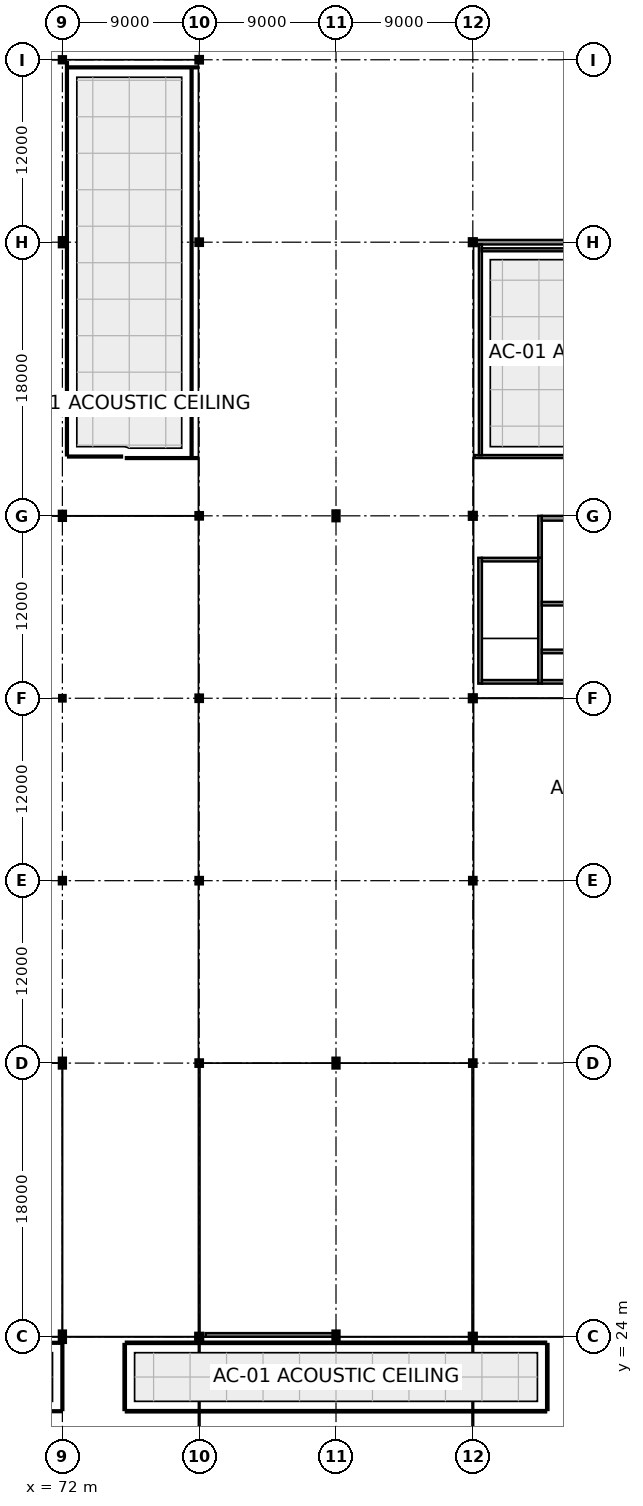
"""IFC4 building model, lengths in metres.
Left out: names, types, materials, properties, quantities, classifications, styles, units other than length and angle.
Written with IfcOpenShell. Run it as: python <this file> out.ifc"""

import sys

from ifc_helpers import new_model, si_unit, direction, frame, frame_2d, origin, origin_2d, place, context, subcontext, project, spatial, rectangle, hollow_circle, i_section, extrude, element, fill, save


model = new_model("IFC4")
c1 = context("Model", 3, precision=1e-05, world=origin(), true_north=direction((0.0, 1.0)))
c2 = subcontext(c1, "Body", "Model", "MODEL_VIEW")
j1 = project(units=[si_unit("LENGTHUNIT", "METRE"), si_unit("PLANEANGLEUNIT", "RADIAN")], contexts=[c1])
p1 = place(None, origin())
s1 = spatial("IfcSite", under=j1, at=p1, CompositionType="ELEMENT")
p2 = place(p1, origin())
s2 = spatial("IfcBuilding", under=s1, at=p2, CompositionType="ELEMENT")
p3 = place(p2, frame((0.0, 0.0, 5.4)))
s3 = spatial("IfcBuildingStorey", under=s2, at=p3, CompositionType="ELEMENT", Elevation=5.4)
p4 = place(p3, frame((72.0, 24.0, 0.0), z_axis=(0.0, 0.0, 1.0), x_axis=(1.0, 0.0, 0.0)))
e1 = element("IfcColumn", 1, at=p4, inside=s3, PredefinedType="COLUMN", context=c2, shape_type="SweptSolid", body=[
    extrude(i_section(OverallWidth=0.3, OverallDepth=0.65, WebThickness=0.016, FlangeThickness=0.031, at=origin_2d()), origin(), (0.0, 0.0, 1.0), 4.5),
])
p5 = place(p3, frame((72.0, 42.0, 0.0), z_axis=(0.0, 0.0, 1.0), x_axis=(0.0, 1.0, 0.0)))
e2 = element("IfcColumn", 2, at=p5, inside=s3, PredefinedType="COLUMN", context=c2, shape_type="SweptSolid", body=[
    extrude(i_section(OverallWidth=0.3, OverallDepth=0.55, WebThickness=0.015, FlangeThickness=0.029, at=origin_2d()), origin(), (0.0, 0.0, 1.0), 4.5),
])
p6 = place(p3, frame((72.0, 54.0, 0.0), z_axis=(0.0, 0.0, 1.0), x_axis=(1.0, 0.0, 0.0)))
e3 = element("IfcColumn", 3, at=p6, inside=s3, PredefinedType="COLUMN", context=c2, shape_type="SweptSolid", body=[
    extrude(i_section(OverallWidth=0.3, OverallDepth=0.32, WebThickness=0.011, FlangeThickness=0.021, at=origin_2d()), origin(), (0.0, 0.0, 1.0), 4.5),
])
p7 = place(p3, frame((72.0, 66.0, 0.0), z_axis=(0.0, 0.0, 1.0), x_axis=(1.0, 0.0, 0.0)))
e4 = element("IfcColumn", 4, at=p7, inside=s3, PredefinedType="COLUMN", context=c2, shape_type="SweptSolid", body=[
    extrude(i_section(OverallWidth=0.26, OverallDepth=0.26, WebThickness=0.01, FlangeThickness=0.018, at=origin_2d()), origin(), (0.0, 0.0, 1.0), 4.5),
])
for number, where, z_axis, x_axis in (
    (5, (72.0, 78.0, 0.0), (0.0, 0.0, 1.0), (1.0, 0.0, 0.0)),
    (6, (72.0, 96.0, 0.0), (0.0, 0.0, 1.0), (1.0, 0.0, 0.0)),
):
    element("IfcColumn", number, at=place(p3, frame(where, z_axis=z_axis, x_axis=x_axis)), inside=s3, PredefinedType="COLUMN", context=c2, shape_type="SweptSolid", body=[
        extrude(i_section(OverallWidth=0.3, OverallDepth=0.5, WebThickness=0.014, FlangeThickness=0.028, at=origin_2d()), origin(), (0.0, 0.0, 1.0), 4.5),
    ])
p8 = place(p3, frame((72.0, 108.0, 0.0), z_axis=(0.0, 0.0, 1.0), x_axis=(1.0, 0.0, 0.0)))
e7 = element("IfcColumn", 7, at=p8, inside=s3, PredefinedType="COLUMN", context=c2, shape_type="SweptSolid", body=[
    extrude(i_section(OverallWidth=0.3, OverallDepth=0.3, WebThickness=0.011, FlangeThickness=0.019, at=origin_2d()), origin(), (0.0, 0.0, 1.0), 4.5),
])
p9 = place(p3, frame((81.0, 24.0, 0.0), z_axis=(0.0, 0.0, 1.0), x_axis=(1.0, 0.0, 0.0)))
e8 = element("IfcColumn", 8, at=p9, inside=s3, PredefinedType="PILASTER", context=c2, shape_type="SweptSolid", body=[
    extrude(hollow_circle(Radius=0.178, WallThickness=0.016, at=origin_2d()), origin(), (0.0, 0.0, 1.0), 4.5),
])
for number, where, z_axis, x_axis in (
    (9, (81.0, 42.0, 0.0), (0.0, 0.0, 1.0), (1.0, 0.0, 0.0)),
    (10, (81.0, 54.0, 0.0), (0.0, 0.0, 1.0), (1.0, 0.0, 0.0)),
    (11, (81.0, 66.0, 0.0), (0.0, 0.0, 1.0), (1.0, 0.0, 0.0)),
    (12, (81.0, 78.0, 0.0), (0.0, 0.0, 1.0), (1.0, 0.0, 0.0)),
    (13, (81.0, 96.0, 0.0), (0.0, 0.0, 1.0), (1.0, 0.0, 0.0)),
    (14, (81.0, 108.0, 0.0), (0.0, 0.0, 1.0), (1.0, 0.0, 0.0)),
):
    element("IfcColumn", number, at=place(p3, frame(where, z_axis=z_axis, x_axis=x_axis)), inside=s3, PredefinedType="PILASTER", context=c2, shape_type="SweptSolid", body=[
        extrude(hollow_circle(Radius=0.162, WallThickness=0.012, at=origin_2d()), origin(), (0.0, 0.0, 1.0), 4.5),
    ])
p10 = place(p3, frame((90.0, 24.0, 0.0), z_axis=(0.0, 0.0, 1.0), x_axis=(1.0, 0.0, 0.0)))
e15 = element("IfcColumn", 15, at=p10, inside=s3, PredefinedType="COLUMN", context=c2, shape_type="SweptSolid", body=[
    extrude(i_section(OverallWidth=0.3, OverallDepth=0.65, WebThickness=0.016, FlangeThickness=0.031, at=origin_2d()), origin(), (0.0, 0.0, 1.0), 4.5),
])
for number, where, z_axis, x_axis in (
    (16, (90.0, 42.0, 0.0), (0.0, 0.0, 1.0), (1.0, 0.0, 0.0)),
    (17, (90.0, 78.0, 0.0), (0.0, 0.0, 1.0), (1.0, 0.0, 0.0)),
):
    element("IfcColumn", number, at=place(p3, frame(where, z_axis=z_axis, x_axis=x_axis)), inside=s3, PredefinedType="COLUMN", context=c2, shape_type="SweptSolid", body=[
        extrude(i_section(OverallWidth=0.3, OverallDepth=0.55, WebThickness=0.015, FlangeThickness=0.029, at=origin_2d()), origin(), (0.0, 0.0, 1.0), 4.5),
    ])
p11 = place(p3, frame((99.0, 24.0, 0.0), z_axis=(0.0, 0.0, 1.0), x_axis=(1.0, 0.0, 0.0)))
e18 = element("IfcColumn", 18, at=p11, inside=s3, PredefinedType="PILASTER", context=c2, shape_type="SweptSolid", body=[
    extrude(hollow_circle(Radius=0.178, WallThickness=0.016, at=origin_2d()), origin(), (0.0, 0.0, 1.0), 4.5),
])
for number, where, z_axis, x_axis in (
    (19, (99.0, 42.0, 0.0), (0.0, 0.0, 1.0), (1.0, 0.0, 0.0)),
    (20, (99.0, 54.0, 0.0), (0.0, 0.0, 1.0), (1.0, 0.0, 0.0)),
):
    element("IfcColumn", number, at=place(p3, frame(where, z_axis=z_axis, x_axis=x_axis)), inside=s3, PredefinedType="PILASTER", context=c2, shape_type="SweptSolid", body=[
        extrude(hollow_circle(Radius=0.162, WallThickness=0.012, at=origin_2d()), origin(), (0.0, 0.0, 1.0), 4.5),
    ])
for number, where, z_axis, x_axis in (
    (21, (99.0, 66.0, 0.0), (0.0, 0.0, 1.0), (1.0, 0.0, 0.0)),
    (22, (99.0, 78.0, 0.0), (0.0, 0.0, 1.0), (1.0, 0.0, 0.0)),
    (23, (99.0, 96.0, 0.0), (0.0, 0.0, 1.0), (1.0, 0.0, 0.0)),
):
    element("IfcColumn", number, at=place(p3, frame(where, z_axis=z_axis, x_axis=x_axis)), inside=s3, PredefinedType="PILASTER", context=c2, shape_type="SweptSolid", body=[
        extrude(hollow_circle(Radius=0.178, WallThickness=0.016, at=origin_2d()), origin(), (0.0, 0.0, 1.0), 4.5),
    ])
p12 = place(p3, frame((107.992, 96.0, 0.0), z_axis=(0.0, 0.0, 1.0), x_axis=(-1.0, 0.0, 0.0)))
e24 = element("IfcWall", 24, at=p12, inside=s3, PredefinedType="SOLIDWALL", context=c2, shape_type="SweptSolid", body=[
    extrude(rectangle(XDim=8.768, YDim=0.3, at=frame_2d((4.384, 0.0))), origin(), (0.0, 0.0, 1.0), 3.655),
])
p13 = place(p12, frame((1.455, 0.0, 0.8)))
e25 = element("IfcOpeningElement", 25, at=p13, cuts=e24, PredefinedType="OPENING", context=c2, shape_type="SweptSolid", body=[
    extrude(rectangle(XDim=2.0, YDim=2.0, at=frame_2d((1.0, 1.0))), frame((0.0, 0.165, 0.0), z_axis=(0.0, -1.0, 0.0), x_axis=(1.0, 0.0, 0.0)), (0.0, 0.0, 1.0), 0.33),
])
p14 = place(p12, frame((5.313, 0.0, 0.8)))
e26 = element("IfcOpeningElement", 26, at=p14, cuts=e24, PredefinedType="OPENING", context=c2, shape_type="SweptSolid", body=[
    extrude(rectangle(XDim=2.0, YDim=2.0, at=frame_2d((1.0, 1.0))), frame((0.0, 0.165, 0.0), z_axis=(0.0, -1.0, 0.0), x_axis=(1.0, 0.0, 0.0)), (0.0, 0.0, 1.0), 0.33),
])
p15 = place(p3, frame((81.42, 24.12, -0.1), z_axis=(0.0, 0.0, 1.0), x_axis=(1.0, 0.0, 0.0)))
e27 = element("IfcWall", 27, at=p15, inside=s3, PredefinedType="PARAPET", context=c2, shape_type="SweptSolid", body=[
    extrude(rectangle(XDim=8.52, YDim=0.24, at=frame_2d((4.26, 0.0))), origin(), (0.0, 0.0, 1.0), 0.85),
])
p16 = place(p3, frame((99.48, 66.96, 0.0), z_axis=(0.0, 0.0, 1.0), x_axis=(0.0, 1.0, 0.0)))
e28 = element("IfcWall", 28, at=p16, inside=s3, PredefinedType="SHEAR", context=c2, shape_type="SweptSolid", body=[
    extrude(rectangle(XDim=8.28, YDim=0.24, at=frame_2d((4.14, 0.0))), origin(), (0.0, 0.0, 1.0), 4.31),
])
p17 = place(p3, frame((103.42, 66.96, 0.0), z_axis=(0.0, 0.0, 1.0), x_axis=(0.0, 1.0, 0.0)))
e29 = element("IfcWall", 29, at=p17, inside=s3, PredefinedType="SHEAR", context=c2, shape_type="SweptSolid", body=[
    extrude(rectangle(XDim=8.28, YDim=0.24, at=frame_2d((4.14, 0.0))), origin(), (0.0, 0.0, 1.0), 4.31),
])
p18 = place(p17, frame((6.49, 0.0, 0.0)))
e30 = element("IfcOpeningElement", 30, at=p18, cuts=e29, PredefinedType="OPENING", context=c2, shape_type="SweptSolid", body=[
    extrude(rectangle(XDim=1.3, YDim=2.2, at=frame_2d((0.65, 1.1))), frame((0.0, 0.135, 0.0), z_axis=(0.0, -1.0, 0.0), x_axis=(1.0, 0.0, 0.0)), (0.0, 0.0, 1.0), 0.27),
])
for number, where, z_axis, x_axis in (
    (31, (99.6, 67.08, 0.0), (0.0, 0.0, 1.0), (1.0, 0.0, 0.0)),
    (32, (99.6, 75.12, 0.0), (0.0, 0.0, 1.0), (1.0, 0.0, 0.0)),
):
    element("IfcWall", number, at=place(p3, frame(where, z_axis=z_axis, x_axis=x_axis)), inside=s3, PredefinedType="SHEAR", context=c2, shape_type="SweptSolid", body=[
        extrude(rectangle(XDim=3.7, YDim=0.24, at=frame_2d((1.85, 0.0))), origin(), (0.0, 0.0, 1.0), 4.31),
    ])
p19 = place(p3, frame((103.42, 75.24, 0.0), z_axis=(0.0, 0.0, 1.0), x_axis=(0.0, 1.0, 0.0)))
e33 = element("IfcWall", 33, at=p19, inside=s3, PredefinedType="SHEAR", context=c2, shape_type="SweptSolid", body=[
    extrude(rectangle(XDim=2.76, YDim=0.24, at=frame_2d((1.38, 0.0))), origin(), (0.0, 0.0, 1.0), 4.16),
])
p20 = place(p3, frame((103.54, 77.84, 0.0), z_axis=(0.0, 0.0, 1.0), x_axis=(1.0, 0.0, 0.0)))
e34 = element("IfcWall", 34, at=p20, inside=s3, PredefinedType="SHEAR", context=c2, shape_type="SweptSolid", body=[
    extrude(rectangle(XDim=3.9, YDim=0.32, at=frame_2d((1.95, 0.0))), origin(), (0.0, 0.0, 1.0), 4.16),
])
p21 = place(p20, frame((1.225, 0.0, 0.0)))
e35 = element("IfcOpeningElement", 35, at=p21, cuts=e34, PredefinedType="OPENING", context=c2, shape_type="SweptSolid", body=[
    extrude(rectangle(XDim=1.45, YDim=2.2, at=frame_2d((0.725, 1.1))), frame((0.0, 0.175, 0.0), z_axis=(0.0, -1.0, 0.0), x_axis=(1.0, 0.0, 0.0)), (0.0, 0.0, 1.0), 0.35),
])
p22 = place(p3, frame((103.54, 72.22, 0.0), z_axis=(0.0, 0.0, 1.0), x_axis=(1.0, 0.0, 0.0)))
e36 = element("IfcWall", 36, at=p22, inside=s3, PredefinedType="SHEAR", context=c2, shape_type="SweptSolid", body=[
    extrude(rectangle(XDim=3.9, YDim=0.24, at=frame_2d((1.95, 0.0))), origin(), (0.0, 0.0, 1.0), 4.31),
])
p23 = place(p22, frame((0.385, 0.0, 0.0)))
e37 = element("IfcOpeningElement", 37, at=p23, cuts=e36, PredefinedType="OPENING", context=c2, shape_type="SweptSolid", body=[
    extrude(rectangle(XDim=1.3, YDim=2.2, at=frame_2d((0.65, 1.1))), frame((0.0, 0.135, 0.0), z_axis=(0.0, -1.0, 0.0), x_axis=(1.0, 0.0, 0.0)), (0.0, 0.0, 1.0), 0.27),
])
p24 = place(p22, frame((2.335, 0.0, 0.0)))
e38 = element("IfcOpeningElement", 38, at=p24, cuts=e36, PredefinedType="OPENING", context=c2, shape_type="SweptSolid", body=[
    extrude(rectangle(XDim=1.3, YDim=2.2, at=frame_2d((0.65, 1.1))), frame((0.0, 0.135, 0.0), z_axis=(0.0, -1.0, 0.0), x_axis=(1.0, 0.0, 0.0)), (0.0, 0.0, 1.0), 0.27),
])
p25 = place(p3, frame((103.54, 69.08, 0.0), z_axis=(0.0, 0.0, 1.0), x_axis=(1.0, 0.0, 0.0)))
e39 = element("IfcWall", 39, at=p25, inside=s3, PredefinedType="SHEAR", context=c2, shape_type="SweptSolid", body=[
    extrude(rectangle(XDim=3.9, YDim=0.24, at=frame_2d((1.95, 0.0))), origin(), (0.0, 0.0, 1.0), 4.31),
])
p26 = place(p3, frame((103.54, 67.08, 0.0), z_axis=(0.0, 0.0, 1.0), x_axis=(1.0, 0.0, 0.0)))
e40 = element("IfcWall", 40, at=p26, inside=s3, PredefinedType="SHEAR", context=c2, shape_type="SweptSolid", body=[
    extrude(rectangle(XDim=2.26, YDim=0.24, at=frame_2d((1.13, 0.0))), origin(), (0.0, 0.0, 1.0), 4.31),
])
p27 = place(p3, frame((75.92, 81.9, 0.0), z_axis=(0.0, 0.0, 1.0), x_axis=(-1.0, 0.0, 0.0)))
e41 = element("IfcWall", 41, at=p27, inside=s3, PredefinedType="PARTITIONING", context=c2, shape_type="SweptSolid", body=[
    extrude(rectangle(XDim=3.54, YDim=0.12, at=frame_2d((1.77, 0.0))), origin(), (0.0, 0.0, 1.0), 4.14),
])
p28 = place(p27, frame((1.32, 0.0, 0.0)))
e42 = element("IfcOpeningElement", 42, at=p28, cuts=e41, PredefinedType="OPENING", context=c2, shape_type="SweptSolid", body=[
    extrude(rectangle(XDim=0.9, YDim=2.1, at=frame_2d((0.45, 1.05))), frame((0.0, 0.075, 0.0), z_axis=(0.0, -1.0, 0.0), x_axis=(1.0, 0.0, 0.0)), (0.0, 0.0, 1.0), 0.15),
])
p29 = place(p3, frame((72.3, 81.98, 0.0), z_axis=(0.0, 0.0, 1.0), x_axis=(0.0, 1.0, 0.0)))
e43 = element("IfcWall", 43, at=p29, inside=s3, PredefinedType="PARTITIONING", context=c2, shape_type="SweptSolid", body=[
    extrude(rectangle(XDim=25.872, YDim=0.12, at=frame_2d((12.936, 0.0))), origin(), (0.0, 0.0, 1.0), 4.14),
])
p30 = place(p3, frame((72.355, 107.5, 0.0), z_axis=(0.0, 0.0, 1.0), x_axis=(1.0, 0.0, 0.0)))
e44 = element("IfcWall", 44, at=p30, inside=s3, PredefinedType="PARTITIONING", context=c2, shape_type="SweptSolid", body=[
    extrude(rectangle(XDim=8.52, YDim=0.12, at=frame_2d((4.26, 0.0))), origin(), (0.0, 0.0, 1.0), 4.14),
])
p31 = place(p3, frame((80.5, 107.445, 0.0), z_axis=(0.0, 0.0, 1.0), x_axis=(0.0, -1.0, 0.0)))
e45 = element("IfcWall", 45, at=p31, inside=s3, PredefinedType="PARTITIONING", context=c2, shape_type="SweptSolid", body=[
    extrude(rectangle(XDim=25.565, YDim=0.12, at=frame_2d((12.783, 0.0))), origin(), (0.0, 0.0, 1.0), 4.14),
])
p32 = place(p3, frame((80.875, 81.8, 0.0), z_axis=(0.0, 0.0, 1.0), x_axis=(-1.0, 0.0, 0.0)))
e46 = element("IfcWall", 46, at=p32, inside=s3, PredefinedType="PARTITIONING", context=c2, shape_type="SweptSolid", body=[
    extrude(rectangle(XDim=4.695, YDim=0.12, at=frame_2d((2.348, 0.0))), origin(), (0.0, 0.0, 1.0), 4.14),
])
p33 = place(p3, frame((116.72, 81.9, 0.0), z_axis=(0.0, 0.0, 1.0), x_axis=(-1.0, 0.0, 0.0)))
e47 = element("IfcWall", 47, at=p33, inside=s3, PredefinedType="PARTITIONING", context=c2, shape_type="SweptSolid", body=[
    extrude(rectangle(XDim=17.595, YDim=0.2, at=frame_2d((8.797, 0.0))), origin(), (0.0, 0.0, 1.0), 4.14),
])
p34 = place(p33, frame((7.797, 0.0, 0.0)))
e48 = element("IfcOpeningElement", 48, at=p34, cuts=e47, PredefinedType="OPENING", context=c2, shape_type="SweptSolid", body=[
    extrude(rectangle(XDim=2.0, YDim=2.6, at=frame_2d((1.0, 1.3))), frame((0.0, 0.115, 0.0), z_axis=(0.0, -1.0, 0.0), x_axis=(1.0, 0.0, 0.0)), (0.0, 0.0, 1.0), 0.23),
])
p35 = place(p33, frame((15.545, 0.0, 1.05)))
e49 = element("IfcOpeningElement", 49, at=p35, cuts=e47, PredefinedType="OPENING", context=c2, shape_type="SweptSolid", body=[
    extrude(rectangle(XDim=1.2, YDim=1.0, at=frame_2d((0.6, 0.5))), frame((0.0, 0.115, 0.0), z_axis=(0.0, -1.0, 0.0), x_axis=(1.0, 0.0, 0.0)), (0.0, 0.0, 1.0), 0.23),
])
p36 = place(p3, frame((99.5, 81.98, 0.0), z_axis=(0.0, 0.0, 1.0), x_axis=(0.0, 1.0, 0.0)))
e50 = element("IfcWall", 50, at=p36, inside=s3, PredefinedType="PARTITIONING", context=c2, shape_type="SweptSolid", body=[
    extrude(rectangle(XDim=13.875, YDim=0.2, at=frame_2d((6.938, 0.0))), origin(), (0.0, 0.0, 1.0), 4.14),
])
p37 = place(p3, frame((99.58, 95.5, 0.0), z_axis=(0.0, 0.0, 1.0), x_axis=(1.0, 0.0, 0.0)))
e51 = element("IfcWall", 51, at=p37, inside=s3, PredefinedType="PARTITIONING", context=c2, shape_type="SweptSolid", body=[
    extrude(rectangle(XDim=17.14, YDim=0.2, at=frame_2d((8.57, 0.0))), origin(), (0.0, 0.0, 1.0), 4.14),
])
p38 = place(p3, frame((32.955, 23.6, 0.0), z_axis=(0.0, 0.0, 1.0), x_axis=(1.0, 0.0, 0.0)))
e52 = element("IfcWall", 52, at=p38, inside=s3, PredefinedType="PARTITIONING", context=c2, shape_type="SweptSolid", body=[
    extrude(rectangle(XDim=38.965, YDim=0.12, at=frame_2d((19.482, 0.0))), origin(), (0.0, 0.0, 1.0), 4.14),
])
p39 = place(p3, frame((72.0, 23.52, 0.0), z_axis=(0.0, 0.0, 1.0), x_axis=(0.0, -1.0, 0.0)))
e53 = element("IfcWall", 53, at=p39, inside=s3, PredefinedType="PARTITIONING", context=c2, shape_type="SweptSolid", body=[
    extrude(rectangle(XDim=4.34, YDim=0.12, at=frame_2d((2.17, 0.0))), origin(), (0.0, 0.0, 1.0), 3.625),
])
p40 = place(p3, frame((71.92, 19.1, 0.0), z_axis=(0.0, 0.0, 1.0), x_axis=(-1.0, 0.0, 0.0)))
e54 = element("IfcWall", 54, at=p40, inside=s3, PredefinedType="PARTITIONING", context=c2, shape_type="SweptSolid", body=[
    extrude(rectangle(XDim=39.375, YDim=0.12, at=frame_2d((19.688, 0.0))), origin(), (0.0, 0.0, 1.0), 4.14),
])
p41 = place(p40, frame((19.212, 0.0, 0.0)))
e55 = element("IfcOpeningElement", 55, at=p41, cuts=e54, PredefinedType="OPENING", context=c2, shape_type="SweptSolid", body=[
    extrude(rectangle(XDim=0.95, YDim=2.15, at=frame_2d((0.475, 1.075))), frame((0.0, 0.075, 0.0), z_axis=(0.0, -1.0, 0.0), x_axis=(1.0, 0.0, 0.0)), (0.0, 0.0, 1.0), 0.15),
])
p42 = place(p3, frame((103.82, 19.1, 0.0), z_axis=(0.0, 0.0, 1.0), x_axis=(-1.0, 0.0, 0.0)))
e56 = element("IfcWall", 56, at=p42, inside=s3, PredefinedType="PARTITIONING", context=c2, shape_type="SweptSolid", body=[
    extrude(rectangle(XDim=27.64, YDim=0.15, at=frame_2d((13.82, 0.0))), origin(), (0.0, 0.0, 1.0), 4.14),
])
p43 = place(p42, frame((13.295, 0.0, 0.0)))
e57 = element("IfcOpeningElement", 57, at=p43, cuts=e56, PredefinedType="OPENING", context=c2, shape_type="SweptSolid", body=[
    extrude(rectangle(XDim=1.05, YDim=2.25, at=frame_2d((0.525, 1.125))), frame((0.0, 0.09, 0.0), z_axis=(0.0, -1.0, 0.0), x_axis=(1.0, 0.0, 0.0)), (0.0, 0.0, 1.0), 0.18),
])
p44 = place(p3, frame((76.1, 19.18, 0.0), z_axis=(0.0, 0.0, 1.0), x_axis=(0.0, 1.0, 0.0)))
e58 = element("IfcWall", 58, at=p44, inside=s3, PredefinedType="PARTITIONING", context=c2, shape_type="SweptSolid", body=[
    extrude(rectangle(XDim=4.34, YDim=0.15, at=frame_2d((2.17, 0.0))), origin(), (0.0, 0.0, 1.0), 4.14),
])
p45 = place(p3, frame((76.18, 23.6, 0.0), z_axis=(0.0, 0.0, 1.0), x_axis=(1.0, 0.0, 0.0)))
e59 = element("IfcWall", 59, at=p45, inside=s3, PredefinedType="PARTITIONING", context=c2, shape_type="SweptSolid", body=[
    extrude(rectangle(XDim=27.64, YDim=0.15, at=frame_2d((13.82, 0.0))), origin(), (0.0, 0.0, 1.0), 4.14),
])
p46 = place(p3, frame((103.9, 23.52, 0.0), z_axis=(0.0, 0.0, 1.0), x_axis=(0.0, -1.0, 0.0)))
e60 = element("IfcWall", 60, at=p46, inside=s3, PredefinedType="PARTITIONING", context=c2, shape_type="SweptSolid", body=[
    extrude(rectangle(XDim=4.34, YDim=0.15, at=frame_2d((2.17, 0.0))), origin(), (0.0, 0.0, 1.0), 4.14),
])
p47 = place(p13, origin())
e61 = element("IfcWindow", 61, at=p47, inside=s3, PartitioningType="SINGLE_PANEL", PredefinedType="WINDOW", context=c2, shape_type="SweptSolid", body=[
    extrude(rectangle(XDim=2.0, YDim=2.0, at=frame_2d((1.0, 1.0))), frame((0.0, 0.03, 0.0), z_axis=(0.0, -1.0, 0.0), x_axis=(1.0, 0.0, 0.0)), (0.0, 0.0, 1.0), 0.06),
])
fill(e25, e61)
p48 = place(p14, origin())
e62 = element("IfcWindow", 62, at=p48, inside=s3, PartitioningType="SINGLE_PANEL", PredefinedType="WINDOW", context=c2, shape_type="SweptSolid", body=[
    extrude(rectangle(XDim=2.0, YDim=2.0, at=frame_2d((1.0, 1.0))), frame((0.0, 0.03, 0.0), z_axis=(0.0, -1.0, 0.0), x_axis=(1.0, 0.0, 0.0)), (0.0, 0.0, 1.0), 0.06),
])
fill(e26, e62)
p49 = place(p18, frame((1.3, 0.0, 0.0), z_axis=(0.0, 0.0, 1.0), x_axis=(-1.0, 0.0, 0.0)))
e63 = element("IfcDoor", 63, at=p49, inside=s3, OperationType="SINGLE_SWING_RIGHT", PredefinedType="DOOR", context=c2, shape_type="SweptSolid", body=[
    extrude(rectangle(XDim=1.3, YDim=2.2, at=frame_2d((0.65, 1.1))), frame((0.0, 0.025, 0.0), z_axis=(0.0, -1.0, 0.0), x_axis=(1.0, 0.0, 0.0)), (0.0, 0.0, 1.0), 0.05),
])
fill(e30, e63)
p50 = place(p21, origin())
e64 = element("IfcDoor", 64, at=p50, inside=s3, OperationType="DOUBLE_DOOR_SINGLE_SWING", PredefinedType="DOOR", context=c2, shape_type="SweptSolid", body=[
    extrude(rectangle(XDim=1.45, YDim=2.2, at=frame_2d((0.725, 1.1))), frame((0.0, 0.025, 0.0), z_axis=(0.0, -1.0, 0.0), x_axis=(1.0, 0.0, 0.0)), (0.0, 0.0, 1.0), 0.05),
])
fill(e35, e64)
p51 = place(p23, origin())
e65 = element("IfcDoor", 65, at=p51, inside=s3, OperationType="DOUBLE_DOOR_SLIDING", PredefinedType="DOOR", context=c2, shape_type="SweptSolid", body=[
    extrude(rectangle(XDim=1.3, YDim=2.2, at=frame_2d((0.65, 1.1))), frame((0.0, 0.025, 0.0), z_axis=(0.0, -1.0, 0.0), x_axis=(1.0, 0.0, 0.0)), (0.0, 0.0, 1.0), 0.05),
])
fill(e37, e65)
p52 = place(p28, frame((0.9, 0.0, 0.0), z_axis=(0.0, 0.0, 1.0), x_axis=(-1.0, 0.0, 0.0)))
e66 = element("IfcDoor", 66, at=p52, inside=s3, OperationType="SINGLE_SWING_LEFT", PredefinedType="DOOR", context=c2, shape_type="SweptSolid", body=[
    extrude(rectangle(XDim=0.9, YDim=2.1, at=frame_2d((0.45, 1.05))), frame((0.0, 0.025, 0.0), z_axis=(0.0, -1.0, 0.0), x_axis=(1.0, 0.0, 0.0)), (0.0, 0.0, 1.0), 0.05),
])
fill(e42, e66)
p53 = place(p35, origin())
e67 = element("IfcWindow", 67, at=p53, inside=s3, PartitioningType="SINGLE_PANEL", PredefinedType="WINDOW", context=c2, shape_type="SweptSolid", body=[
    extrude(rectangle(XDim=1.2, YDim=1.0, at=frame_2d((0.6, 0.5))), frame((0.0, 0.03, 0.0), z_axis=(0.0, -1.0, 0.0), x_axis=(1.0, 0.0, 0.0)), (0.0, 0.0, 1.0), 0.06),
])
fill(e49, e67)
p54 = place(p43, frame((1.05, 0.0, 0.0), z_axis=(0.0, 0.0, 1.0), x_axis=(-1.0, 0.0, 0.0)))
e68 = element("IfcDoor", 68, at=p54, inside=s3, OperationType="SINGLE_SWING_RIGHT", PredefinedType="DOOR", context=c2, shape_type="SweptSolid", body=[
    extrude(rectangle(XDim=1.05, YDim=2.25, at=frame_2d((0.525, 1.125))), frame((0.0, 0.025, 0.0), z_axis=(0.0, -1.0, 0.0), x_axis=(1.0, 0.0, 0.0)), (0.0, 0.0, 1.0), 0.05),
])
fill(e57, e68)
save(model, sys.argv[1])
